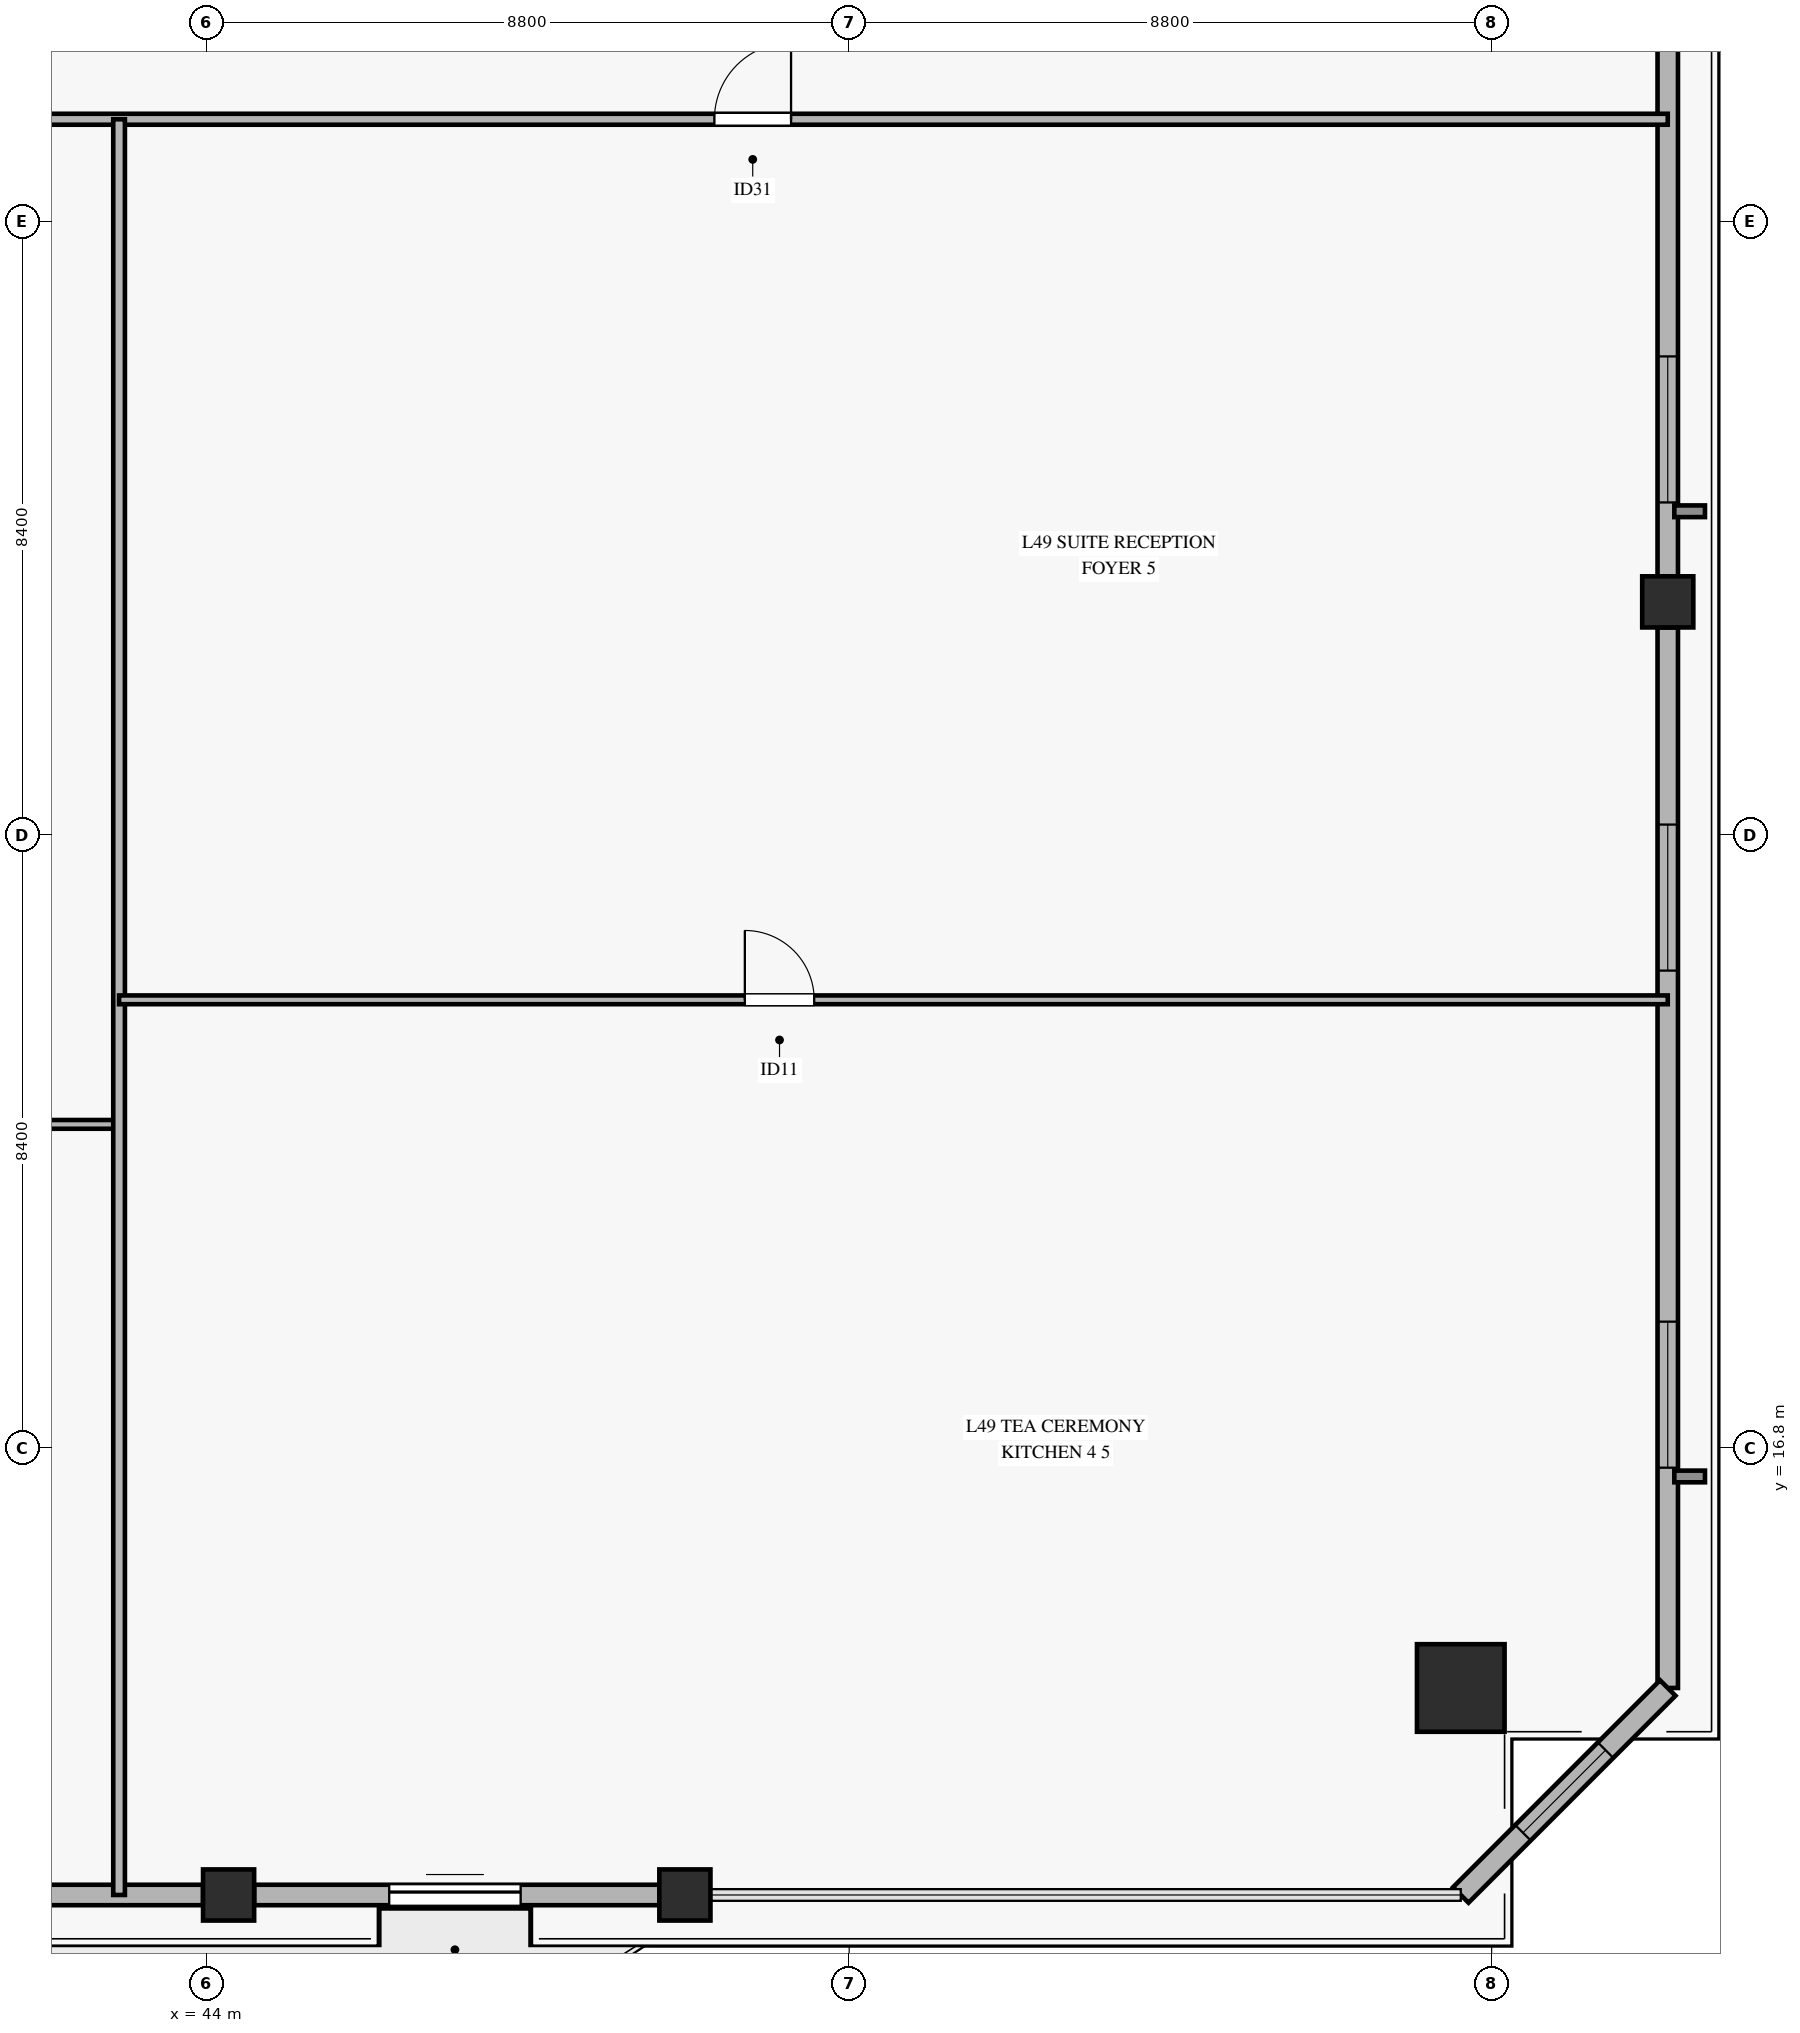
"""IFC4 building model, lengths in metres.
Left out: names, types, materials, properties, quantities, classifications, styles, units other than length and angle.
Written with IfcOpenShell. Run it as: python <this file> out.ifc"""

import sys

from ifc_helpers import new_model, si_unit, direction, frame, frame_2d, origin, origin_2d, place, context, subcontext, project, spatial, rectangle, hollow_rectangle, extrude, source, transform, mapped, element, fill, save


model = new_model("IFC4")
c1 = context("Model", 3, precision=1e-05, world=origin(), true_north=direction((0.0, 1.0)))
c2 = subcontext(c1, "Body", "Model", "MODEL_VIEW")
j1 = project(units=[si_unit("LENGTHUNIT", "METRE"), si_unit("PLANEANGLEUNIT", "RADIAN")], contexts=[c1])
p1 = place(None, origin())
s1 = spatial("IfcSite", under=j1, at=p1, CompositionType="ELEMENT")
p2 = place(p1, origin())
s2 = spatial("IfcBuilding", under=s1, at=p2, CompositionType="ELEMENT")
p3 = place(p2, frame((0.0, 0.0, 195.7)))
s3 = spatial("IfcBuildingStorey", under=s2, at=p3, CompositionType="ELEMENT", Elevation=195.7)
m1 = source(origin(), c2, "Body", "SweptSolid", [
    extrude(hollow_rectangle(XDim=1.2, YDim=1.2, WallThickness=0.055, at=origin_2d()), origin(), (0.0, 0.0, 1.0), 3.27),
])
p4 = place(p3, frame((61.177, 13.515, 0.0), z_axis=(0.0, 0.0, 1.0), x_axis=(1.0, 0.0, 0.0)))
e1 = element("IfcColumn", 1, at=p4, inside=s3, PredefinedType="COLUMN", context=c2, shape_type="MappedRepresentation", body=[
    mapped(m1, transform((0.0, 0.0, 0.0), x_axis=(1.0, 0.0, 0.0), y_axis=(0.0, 1.0, 0.0), z_axis=(0.0, 0.0, 1.0), scale=1.0)),
])
m2 = source(origin(), c2, "Body", "SweptSolid", [
    extrude(hollow_rectangle(XDim=0.7, YDim=0.7, WallThickness=0.032, at=origin_2d()), origin(), (0.0, 0.0, 1.0), 3.27),
])
for number, where, z_axis, x_axis in (
    (2, (44.3, 10.68, 0.0), (0.0, 0.0, 1.0), (1.0, 0.0, 0.0)),
    (3, (50.55, 10.68, 0.0), (0.0, 0.0, 1.0), (1.0, 0.0, 0.0)),
    (4, (64.012, 28.39, 0.0), (0.0, 0.0, 1.0), (1.0, 0.0, 0.0)),
):
    element("IfcColumn", number, at=place(p3, frame(where, z_axis=z_axis, x_axis=x_axis)), inside=s3, PredefinedType="COLUMN", context=c2, shape_type="MappedRepresentation", body=[
        mapped(m2, transform((0.0, 0.0, 0.0), x_axis=(1.0, 0.0, 0.0), y_axis=(0.0, 1.0, 0.0), z_axis=(0.0, 0.0, 1.0), scale=1.0)),
    ])
p5 = place(p3, frame((37.9, 10.68, 0.0), z_axis=(0.0, 0.0, 1.0), x_axis=(1.0, 0.0, 0.0)))
e5 = element("IfcWall", 5, at=p5, inside=s3, PredefinedType="SOLIDWALL", context=c2, shape_type="SweptSolid", body=[
    extrude(rectangle(XDim=6.05, YDim=0.28, at=frame_2d((3.025, 0.0))), origin(), (0.0, 0.0, 1.0), 2.75),
])
p6 = place(p3, frame((44.65, 10.68, 0.0), z_axis=(0.0, 0.0, 1.0), x_axis=(1.0, 0.0, 0.0)))
e6 = element("IfcWall", 6, at=p6, inside=s3, PredefinedType="SOLIDWALL", context=c2, shape_type="SweptSolid", body=[
    extrude(rectangle(XDim=5.55, YDim=0.28, at=frame_2d((2.775, 0.0))), origin(), (0.0, 0.0, 1.0), 2.75),
])
p7 = place(p6, frame((1.85, 0.0, 0.0)))
e7 = element("IfcOpeningElement", 7, at=p7, cuts=e6, PredefinedType="OPENING", context=c2, shape_type="SweptSolid", body=[
    extrude(rectangle(XDim=1.8, YDim=2.25, at=frame_2d((0.9, 1.125))), frame((0.0, 0.15, 0.0), z_axis=(0.0, -1.0, 0.0), x_axis=(1.0, 0.0, 0.0)), (0.0, 0.0, 1.0), 0.3),
])
p8 = place(p3, frame((64.012, 13.515, 0.0), z_axis=(0.0, 0.0, 1.0), x_axis=(0.0, 1.0, 0.0)))
e8 = element("IfcWall", 8, at=p8, inside=s3, PredefinedType="SOLIDWALL", context=c2, shape_type="SweptSolid", body=[
    extrude(rectangle(XDim=14.525, YDim=0.28, at=frame_2d((7.263, 0.0))), origin(), (0.0, 0.0, 1.0), 2.75),
])
p9 = place(p8, frame((3.017, 0.0, 0.45)))
e9 = element("IfcOpeningElement", 9, at=p9, cuts=e8, PredefinedType="OPENING", context=c2, shape_type="SweptSolid", body=[
    extrude(rectangle(XDim=2.0, YDim=2.0, at=frame_2d((1.0, 1.0))), frame((0.0, 0.15, 0.0), z_axis=(0.0, -1.0, 0.0), x_axis=(1.0, 0.0, 0.0)), (0.0, 0.0, 1.0), 0.3),
])
p10 = place(p8, frame((9.825, 0.0, 0.45)))
e10 = element("IfcOpeningElement", 10, at=p10, cuts=e8, PredefinedType="OPENING", context=c2, shape_type="SweptSolid", body=[
    extrude(rectangle(XDim=2.0, YDim=2.0, at=frame_2d((1.0, 1.0))), frame((0.0, 0.15, 0.0), z_axis=(0.0, -1.0, 0.0), x_axis=(1.0, 0.0, 0.0)), (0.0, 0.0, 1.0), 0.3),
])
p11 = place(p3, frame((64.012, 28.74, 0.0), z_axis=(0.0, 0.0, 1.0), x_axis=(0.0, 1.0, 0.0)))
e11 = element("IfcWall", 11, at=p11, inside=s3, PredefinedType="SOLIDWALL", context=c2, shape_type="SweptSolid", body=[
    extrude(rectangle(XDim=14.525, YDim=0.28, at=frame_2d((7.262, 0.0))), origin(), (0.0, 0.0, 1.0), 2.75),
])
p12 = place(p11, frame((1.012, 0.0, 0.45)))
e12 = element("IfcOpeningElement", 12, at=p12, cuts=e11, PredefinedType="OPENING", context=c2, shape_type="SweptSolid", body=[
    extrude(rectangle(XDim=2.0, YDim=2.0, at=frame_2d((1.0, 1.0))), frame((0.0, 0.15, 0.0), z_axis=(0.0, -1.0, 0.0), x_axis=(1.0, 0.0, 0.0)), (0.0, 0.0, 1.0), 0.3),
])
p13 = place(p11, frame((10.884, 0.0, 0.45)))
e13 = element("IfcOpeningElement", 13, at=p13, cuts=e11, PredefinedType="OPENING", context=c2, shape_type="SweptSolid", body=[
    extrude(rectangle(XDim=2.0, YDim=2.0, at=frame_2d((1.0, 1.0))), frame((0.0, 0.15, 0.0), z_axis=(0.0, -1.0, 0.0), x_axis=(1.0, 0.0, 0.0)), (0.0, 0.0, 1.0), 0.3),
])
p14 = place(p3, frame((61.177, 10.68, 0.0), z_axis=(0.0, 0.0, 1.0), x_axis=(0.707106781187, 0.707106781187, 0.0)))
e14 = element("IfcWall", 14, at=p14, inside=s3, PredefinedType="SOLIDWALL", context=c2, shape_type="SweptSolid", body=[
    extrude(rectangle(XDim=4.009, YDim=0.3, at=frame_2d((2.005, 0.0))), origin(), (0.0, 0.0, 1.0), 2.75),
])
p15 = place(p14, frame((1.205, 0.0, 0.45)))
e15 = element("IfcOpeningElement", 15, at=p15, cuts=e14, PredefinedType="OPENING", context=c2, shape_type="SweptSolid", body=[
    extrude(rectangle(XDim=1.6, YDim=2.0, at=frame_2d((0.8, 1.0))), frame((0.0, 0.16, 0.0), z_axis=(0.0, -1.0, 0.0), x_axis=(1.0, 0.0, 0.0)), (0.0, 0.0, 1.0), 0.32),
])
p16 = place(p3, frame((6.389, 35.0, 0.0), z_axis=(0.0, 0.0, 1.0), x_axis=(1.0, 0.0, 0.0)))
e16 = element("IfcWall", 16, at=p16, inside=s3, PredefinedType="PARTITIONING", context=c2, shape_type="SweptSolid", body=[
    extrude(rectangle(XDim=57.623, YDim=0.15, at=frame_2d((28.812, 0.0))), origin(), (0.0, 0.0, 1.0), 2.455),
])
p17 = place(p16, frame((6.605, 0.0, 0.0)))
e17 = element("IfcOpeningElement", 17, at=p17, cuts=e16, PredefinedType="OPENING", context=c2, shape_type="SweptSolid", body=[
    extrude(rectangle(XDim=1.05, YDim=2.15, at=frame_2d((0.525, 1.075))), frame((0.0, 0.085, 0.0), z_axis=(0.0, -1.0, 0.0), x_axis=(1.0, 0.0, 0.0)), (0.0, 0.0, 1.0), 0.17),
])
p18 = place(p16, frame((19.288, 0.0, 0.0)))
e18 = element("IfcOpeningElement", 18, at=p18, cuts=e16, PredefinedType="OPENING", context=c2, shape_type="SweptSolid", body=[
    extrude(rectangle(XDim=1.05, YDim=2.15, at=frame_2d((0.525, 1.075))), frame((0.0, 0.085, 0.0), z_axis=(0.0, -1.0, 0.0), x_axis=(1.0, 0.0, 0.0)), (0.0, 0.0, 1.0), 0.17),
])
p19 = place(p16, frame((25.888, 0.0, 0.0)))
e19 = element("IfcOpeningElement", 19, at=p19, cuts=e16, PredefinedType="OPENING", context=c2, shape_type="SweptSolid", body=[
    extrude(rectangle(XDim=1.05, YDim=2.15, at=frame_2d((0.525, 1.075))), frame((0.0, 0.085, 0.0), z_axis=(0.0, -1.0, 0.0), x_axis=(1.0, 0.0, 0.0)), (0.0, 0.0, 1.0), 0.17),
])
p20 = place(p16, frame((32.381, 0.0, 0.0)))
e20 = element("IfcOpeningElement", 20, at=p20, cuts=e16, PredefinedType="OPENING", context=c2, shape_type="SweptSolid", body=[
    extrude(rectangle(XDim=1.05, YDim=2.15, at=frame_2d((0.525, 1.075))), frame((0.0, 0.085, 0.0), z_axis=(0.0, -1.0, 0.0), x_axis=(1.0, 0.0, 0.0)), (0.0, 0.0, 1.0), 0.17),
])
p21 = place(p16, frame((44.565, 0.0, 0.0)))
e21 = element("IfcOpeningElement", 21, at=p21, cuts=e16, PredefinedType="OPENING", context=c2, shape_type="SweptSolid", body=[
    extrude(rectangle(XDim=1.05, YDim=2.15, at=frame_2d((0.525, 1.075))), frame((0.0, 0.085, 0.0), z_axis=(0.0, -1.0, 0.0), x_axis=(1.0, 0.0, 0.0)), (0.0, 0.0, 1.0), 0.17),
])
p22 = place(p3, frame((36.2, 21.234, 0.0), z_axis=(0.0, 0.0, 1.0), x_axis=(1.0, 0.0, 0.0)))
e22 = element("IfcWall", 22, at=p22, inside=s3, PredefinedType="PARTITIONING", context=c2, shape_type="SweptSolid", body=[
    extrude(rectangle(XDim=6.6, YDim=0.12, at=frame_2d((3.3, 0.0))), origin(), (0.0, 0.0, 1.0), 2.455),
])
p23 = place(p22, frame((3.025, 0.0, 0.0)))
e23 = element("IfcOpeningElement", 23, at=p23, cuts=e22, PredefinedType="OPENING", context=c2, shape_type="SweptSolid", body=[
    extrude(rectangle(XDim=0.95, YDim=2.1, at=frame_2d((0.475, 1.05))), frame((0.0, 0.07, 0.0), z_axis=(0.0, -1.0, 0.0), x_axis=(1.0, 0.0, 0.0)), (0.0, 0.0, 1.0), 0.14),
])
p24 = place(p3, frame((42.8, 10.68, 0.0), z_axis=(0.0, 0.0, 1.0), x_axis=(0.0, 1.0, 0.0)))
e24 = element("IfcWall", 24, at=p24, inside=s3, PredefinedType="PARTITIONING", context=c2, shape_type="SweptSolid", body=[
    extrude(rectangle(XDim=24.32, YDim=0.16, at=frame_2d((12.16, 0.0))), origin(), (0.0, 0.0, 1.0), 2.755),
])
p25 = place(p3, frame((42.8, 22.94, 0.0), z_axis=(0.0, 0.0, 1.0), x_axis=(1.0, 0.0, 0.0)))
e25 = element("IfcWall", 25, at=p25, inside=s3, PredefinedType="PARTITIONING", context=c2, shape_type="SweptSolid", body=[
    extrude(rectangle(XDim=21.212, YDim=0.12, at=frame_2d((10.606, 0.0))), origin(), (0.0, 0.0, 1.0), 2.455),
])
p26 = place(p25, frame((8.571, 0.0, 0.0)))
e26 = element("IfcOpeningElement", 26, at=p26, cuts=e25, PredefinedType="OPENING", context=c2, shape_type="SweptSolid", body=[
    extrude(rectangle(XDim=0.95, YDim=2.1, at=frame_2d((0.475, 1.05))), frame((0.0, 0.07, 0.0), z_axis=(0.0, -1.0, 0.0), x_axis=(1.0, 0.0, 0.0)), (0.0, 0.0, 1.0), 0.14),
])
m3 = source(origin(), c2, "Body", "SweptSolid", [
    extrude(rectangle(XDim=1.8, YDim=2.25, at=frame_2d((0.9, 1.125))), frame((0.0, 0.025, 0.0), z_axis=(0.0, -1.0, 0.0), x_axis=(1.0, 0.0, 0.0)), (0.0, 0.0, 1.0), 0.05),
])
p27 = place(p7, origin())
e27 = element("IfcDoor", 27, at=p27, inside=s3, OperationType="SLIDING_TO_LEFT", PredefinedType="DOOR", context=c2, shape_type="MappedRepresentation", body=[
    mapped(m3, transform((0.0, 0.0, 0.0), x_axis=(1.0, 0.0, 0.0), y_axis=(0.0, 1.0, 0.0), z_axis=(0.0, 0.0, 1.0), scale=1.0)),
])
fill(e7, e27)
m4 = source(origin(), c2, "Body", "SweptSolid", [
    extrude(rectangle(XDim=2.0, YDim=2.0, at=frame_2d((1.0, 1.0))), frame((0.0, 0.03, 0.0), z_axis=(0.0, -1.0, 0.0), x_axis=(1.0, 0.0, 0.0)), (0.0, 0.0, 1.0), 0.06),
])
p28 = place(p9, origin())
e28 = element("IfcWindow", 28, at=p28, inside=s3, PartitioningType="SINGLE_PANEL", PredefinedType="WINDOW", context=c2, shape_type="MappedRepresentation", body=[
    mapped(m4, transform((0.0, 0.0, 0.0), x_axis=(1.0, 0.0, 0.0), y_axis=(0.0, 1.0, 0.0), z_axis=(0.0, 0.0, 1.0), scale=1.0)),
])
fill(e9, e28)
p29 = place(p10, origin())
e29 = element("IfcWindow", 29, at=p29, inside=s3, PartitioningType="SINGLE_PANEL", PredefinedType="WINDOW", context=c2, shape_type="MappedRepresentation", body=[
    mapped(m4, transform((0.0, 0.0, 0.0), x_axis=(1.0, 0.0, 0.0), y_axis=(0.0, 1.0, 0.0), z_axis=(0.0, 0.0, 1.0), scale=1.0)),
])
fill(e10, e29)
p30 = place(p12, origin())
e30 = element("IfcWindow", 30, at=p30, inside=s3, PartitioningType="SINGLE_PANEL", PredefinedType="WINDOW", context=c2, shape_type="MappedRepresentation", body=[
    mapped(m4, transform((0.0, 0.0, 0.0), x_axis=(1.0, 0.0, 0.0), y_axis=(0.0, 1.0, 0.0), z_axis=(0.0, 0.0, 1.0), scale=1.0)),
])
fill(e12, e30)
m5 = source(origin(), c2, "Body", "SweptSolid", [
    extrude(rectangle(XDim=1.6, YDim=2.0, at=frame_2d((0.8, 1.0))), frame((0.0, 0.03, 0.0), z_axis=(0.0, -1.0, 0.0), x_axis=(1.0, 0.0, 0.0)), (0.0, 0.0, 1.0), 0.06),
])
p31 = place(p15, origin())
e31 = element("IfcWindow", 31, at=p31, inside=s3, PartitioningType="SINGLE_PANEL", PredefinedType="WINDOW", context=c2, shape_type="MappedRepresentation", body=[
    mapped(m5, transform((0.0, 0.0, 0.0), x_axis=(1.0, 0.0, 0.0), y_axis=(0.0, 1.0, 0.0), z_axis=(0.0, 0.0, 1.0), scale=1.0)),
])
fill(e15, e31)
m6 = source(origin(), c2, "Body", "SweptSolid", [
    extrude(rectangle(XDim=1.05, YDim=2.15, at=frame_2d((0.525, 1.075))), frame((0.0, 0.025, 0.0), z_axis=(0.0, -1.0, 0.0), x_axis=(1.0, 0.0, 0.0)), (0.0, 0.0, 1.0), 0.05),
])
p32 = place(p21, origin())
e32 = element("IfcDoor", 32, at=p32, inside=s3, OperationType="SINGLE_SWING_RIGHT", PredefinedType="DOOR", context=c2, shape_type="MappedRepresentation", body=[
    mapped(m6, transform((0.0, 0.0, 0.0), x_axis=(1.0, 0.0, 0.0), y_axis=(0.0, 1.0, 0.0), z_axis=(0.0, 0.0, 1.0), scale=1.0)),
])
fill(e21, e32)
m7 = source(origin(), c2, "Body", "SweptSolid", [
    extrude(rectangle(XDim=0.95, YDim=2.1, at=frame_2d((0.475, 1.05))), frame((0.0, 0.025, 0.0), z_axis=(0.0, -1.0, 0.0), x_axis=(1.0, 0.0, 0.0)), (0.0, 0.0, 1.0), 0.05),
])
p33 = place(p26, origin())
e33 = element("IfcDoor", 33, at=p33, inside=s3, OperationType="SINGLE_SWING_LEFT", PredefinedType="DOOR", context=c2, shape_type="MappedRepresentation", body=[
    mapped(m7, transform((0.0, 0.0, 0.0), x_axis=(1.0, 0.0, 0.0), y_axis=(0.0, 1.0, 0.0), z_axis=(0.0, 0.0, 1.0), scale=1.0)),
])
fill(e26, e33)
save(model, sys.argv[1])
